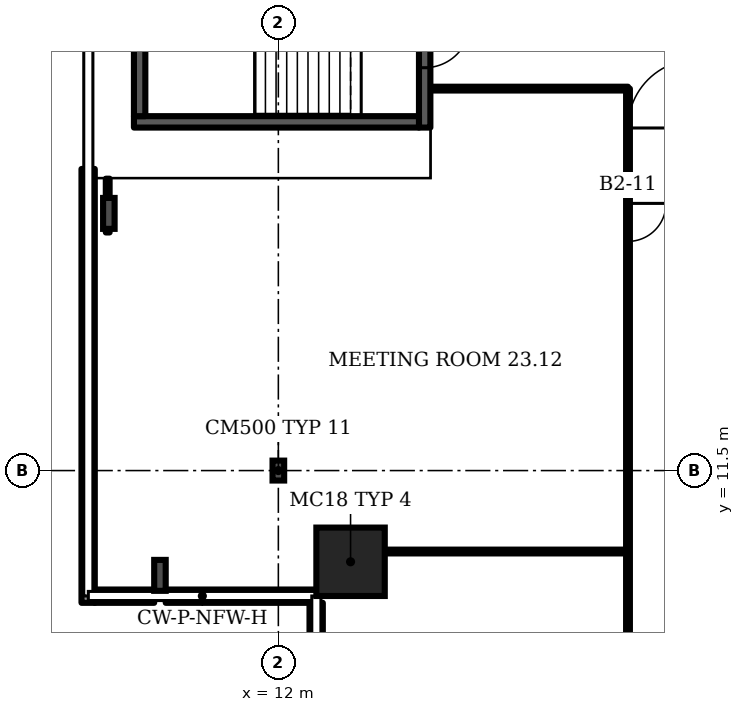
"""IFC4 building model, lengths in metres.
Left out: names, types, materials, properties, quantities, classifications, styles, units other than length and angle.
Written with IfcOpenShell. Run it as: python <this file> out.ifc"""

import sys

from ifc_helpers import new_model, si_unit, direction, frame, frame_2d, origin, origin_2d, place, context, subcontext, project, spatial, rectangle, i_section, extrude, element, fill, save


model = new_model("IFC4")
c1 = context("Model", 3, precision=1e-05, world=origin(), true_north=direction((0.0, 1.0)))
c2 = subcontext(c1, "Body", "Model", "MODEL_VIEW")
j1 = project(units=[si_unit("LENGTHUNIT", "METRE"), si_unit("PLANEANGLEUNIT", "RADIAN")], contexts=[c1])
p1 = place(None, origin())
s1 = spatial("IfcSite", under=j1, at=p1, CompositionType="ELEMENT")
p2 = place(p1, origin())
s2 = spatial("IfcBuilding", under=s1, at=p2, CompositionType="ELEMENT")
p3 = place(p2, frame((0.0, 0.0, 103.9)))
s3 = spatial("IfcBuildingStorey", under=s2, at=p3, CompositionType="ELEMENT", Elevation=103.9)
p4 = place(p3, frame((13.9, 9.1, 0.0), z_axis=(0.0, 0.0, 1.0), x_axis=(1.0, 0.0, 0.0)))
e1 = element("IfcColumn", 1, at=p4, inside=s3, PredefinedType="COLUMN", context=c2, shape_type="SweptSolid", body=[
    extrude(rectangle(XDim=1.8, YDim=1.8, at=origin_2d()), origin(), (0.0, 0.0, 1.0), 3.6),
])
for number, where, z_axis, x_axis in (
    (2, (7.54, 18.267, 0.0), (0.0, 0.0, 1.0), (-1.0, 0.0, 0.0)),
    (3, (8.885, 8.743, 0.0), (0.0, 0.0, 1.0), (-1.0, 0.0, 0.0)),
):
    element("IfcColumn", number, at=place(p3, frame(where, z_axis=z_axis, x_axis=x_axis)), inside=s3, PredefinedType="COLUMN", context=c2, shape_type="SweptSolid", body=[
        extrude(i_section(OverallWidth=0.303, OverallDepth=0.814, WebThickness=0.021, FlangeThickness=0.04, FilletRadius=0.03, at=origin_2d()), origin(), (0.0, 0.0, 1.0), 3.6),
    ])
p5 = place(p3, frame((12.0, 11.5, 0.0), z_axis=(0.0, 0.0, 1.0), x_axis=(1.0, 0.0, 0.0)))
e4 = element("IfcColumn", 4, at=p5, inside=s3, PredefinedType="COLUMN", context=c2, shape_type="SweptSolid", body=[
    extrude(i_section(OverallWidth=0.306, OverallDepth=0.524, WebThickness=0.021, FlangeThickness=0.04, FilletRadius=0.027, at=origin_2d()), origin(), (0.0, 0.0, 1.0), 3.6),
])
p6 = place(p3, frame((6.995, 19.437, 0.0), z_axis=(0.0, 0.0, 1.0), x_axis=(0.0, -1.0, 0.0)))
e5 = element("IfcWall", 5, at=p6, inside=s3, PredefinedType="SOLIDWALL", context=c2, shape_type="SweptSolid", body=[
    extrude(rectangle(XDim=11.417, YDim=0.35, at=frame_2d((5.708, 0.0))), origin(), (0.0, 0.0, 1.0), 1.0),
])
p7 = place(p3, frame((7.17, 8.195, 0.0), z_axis=(0.0, 0.0, 1.0), x_axis=(1.0, 0.0, 0.0)))
e6 = element("IfcWall", 6, at=p7, inside=s3, PredefinedType="SOLIDWALL", context=c2, shape_type="SweptSolid", body=[
    extrude(rectangle(XDim=1.563, YDim=0.35, at=frame_2d((0.782, 0.0))), origin(), (0.0, 0.0, 1.0), 1.0),
])
p8 = place(p3, frame((9.036, 8.195, 0.0), z_axis=(0.0, 0.0, 1.0), x_axis=(1.0, 0.0, 0.0)))
e7 = element("IfcWall", 7, at=p8, inside=s3, PredefinedType="SOLIDWALL", context=c2, shape_type="SweptSolid", body=[
    extrude(rectangle(XDim=3.964, YDim=0.35, at=frame_2d((1.982, 0.0))), origin(), (0.0, 0.0, 1.0), 1.0),
])
p9 = place(p3, frame((12.995, 8.02, 0.0), z_axis=(0.0, 0.0, 1.0), x_axis=(0.0, -1.0, 0.0)))
e8 = element("IfcWall", 8, at=p9, inside=s3, PredefinedType="SOLIDWALL", context=c2, shape_type="SweptSolid", body=[
    extrude(rectangle(XDim=6.161, YDim=0.35, at=frame_2d((3.081, 0.0))), origin(), (0.0, 0.0, 1.0), 1.0),
])
p10 = place(p3, frame((15.85, 20.525, 0.0), z_axis=(0.0, 0.0, 1.0), x_axis=(0.0, 1.0, 0.0)))
e9 = element("IfcWall", 9, at=p10, inside=s3, PredefinedType="SHEAR", context=c2, shape_type="SweptSolid", body=[
    extrude(rectangle(XDim=4.35, YDim=0.3, at=frame_2d((2.175, 0.0))), origin(), (0.0, 0.0, 1.0), 3.2),
])
p11 = place(p10, frame((1.575, 0.0, 0.0)))
e10 = element("IfcOpeningElement", 10, at=p11, cuts=e9, PredefinedType="OPENING", context=c2, shape_type="SweptSolid", body=[
    extrude(rectangle(XDim=1.2, YDim=2.1, at=frame_2d((0.6, 1.05))), frame((0.0, 0.16, 0.0), z_axis=(0.0, -1.0, 0.0), x_axis=(1.0, 0.0, 0.0)), (0.0, 0.0, 1.0), 0.32),
])
p12 = place(p3, frame((7.51, 17.765, 0.0), z_axis=(0.0, 0.0, 1.0), x_axis=(0.0, 1.0, 0.0)))
e11 = element("IfcWall", 11, at=p12, inside=s3, PredefinedType="PARTITIONING", context=c2, shape_type="SweptSolid", body=[
    extrude(rectangle(XDim=1.415, YDim=0.1, at=frame_2d((0.708, 0.0))), origin(), (0.0, 0.0, 1.0), 2.58),
])
p13 = place(p3, frame((14.81, 9.37, 0.0), z_axis=(0.0, 0.0, 1.0), x_axis=(1.0, 0.0, 0.0)))
e12 = element("IfcWall", 12, at=p13, inside=s3, PredefinedType="PARTITIONING", context=c2, shape_type="SweptSolid", body=[
    extrude(rectangle(XDim=6.39, YDim=0.1, at=frame_2d((3.195, 0.0))), origin(), (0.0, 0.0, 1.0), 3.2),
])
p14 = place(p3, frame((16.02, 21.55, 0.0), z_axis=(0.0, 0.0, 1.0), x_axis=(1.0, 0.0, 0.0)))
e13 = element("IfcWall", 13, at=p14, inside=s3, PredefinedType="PARTITIONING", context=c2, shape_type="SweptSolid", body=[
    extrude(rectangle(XDim=5.18, YDim=0.1, at=frame_2d((2.59, 0.0))), origin(), (0.0, 0.0, 1.0), 3.2),
])
p15 = place(p3, frame((21.2, 5.68, 0.0), z_axis=(0.0, 0.0, 1.0), x_axis=(0.0, 1.0, 0.0)))
e14 = element("IfcWall", 14, at=p15, inside=s3, PredefinedType="PARTITIONING", context=c2, shape_type="SweptSolid", body=[
    extrude(rectangle(XDim=15.87, YDim=0.1, at=frame_2d((7.935, 0.0))), origin(), (0.0, 0.0, 1.0), 3.2),
])
p16 = place(p15, frame((11.85, 0.0, 0.0)))
e15 = element("IfcOpeningElement", 15, at=p16, cuts=e14, PredefinedType="OPENING", context=c2, shape_type="SweptSolid", body=[
    extrude(rectangle(XDim=1.0, YDim=2.1, at=frame_2d((0.5, 1.05))), frame((0.0, 0.06, 0.0), z_axis=(0.0, -1.0, 0.0), x_axis=(1.0, 0.0, 0.0)), (0.0, 0.0, 1.0), 0.12),
])
p17 = place(p3, frame((8.2, 20.675, 0.0), z_axis=(0.0, 0.0, 1.0), x_axis=(1.0, 0.0, 0.0)))
e16 = element("IfcWall", 16, at=p17, inside=s3, PredefinedType="SHEAR", context=c2, shape_type="SweptSolid", body=[
    extrude(rectangle(XDim=7.5, YDim=0.3, at=frame_2d((3.75, 0.0))), origin(), (0.0, 0.0, 1.0), 3.2),
])
p18 = place(p3, frame((8.35, 20.825, 0.0), z_axis=(0.0, 0.0, 1.0), x_axis=(0.0, 1.0, 0.0)))
e17 = element("IfcWall", 17, at=p18, inside=s3, PredefinedType="SHEAR", context=c2, shape_type="SweptSolid", body=[
    extrude(rectangle(XDim=3.75, YDim=0.3, at=frame_2d((1.875, 0.0))), origin(), (0.0, 0.0, 1.0), 3.2),
])
p19 = place(p11, origin())
e18 = element("IfcDoor", 18, at=p19, inside=s3, OperationType="SINGLE_SWING_RIGHT", PredefinedType="DOOR", context=c2, shape_type="SweptSolid", body=[
    extrude(rectangle(XDim=1.2, YDim=2.1, at=frame_2d((0.6, 1.05))), frame((0.0, 0.025, 0.0), z_axis=(0.0, -1.0, 0.0), x_axis=(1.0, 0.0, 0.0)), (0.0, 0.0, 1.0), 0.05),
])
fill(e10, e18)
p20 = place(p16, origin())
e19 = element("IfcDoor", 19, at=p20, inside=s3, OperationType="SINGLE_SWING_RIGHT", PredefinedType="DOOR", context=c2, shape_type="SweptSolid", body=[
    extrude(rectangle(XDim=1.0, YDim=2.1, at=frame_2d((0.5, 1.05))), frame((0.0, 0.025, 0.0), z_axis=(0.0, -1.0, 0.0), x_axis=(1.0, 0.0, 0.0)), (0.0, 0.0, 1.0), 0.05),
])
fill(e15, e19)
save(model, sys.argv[1])
